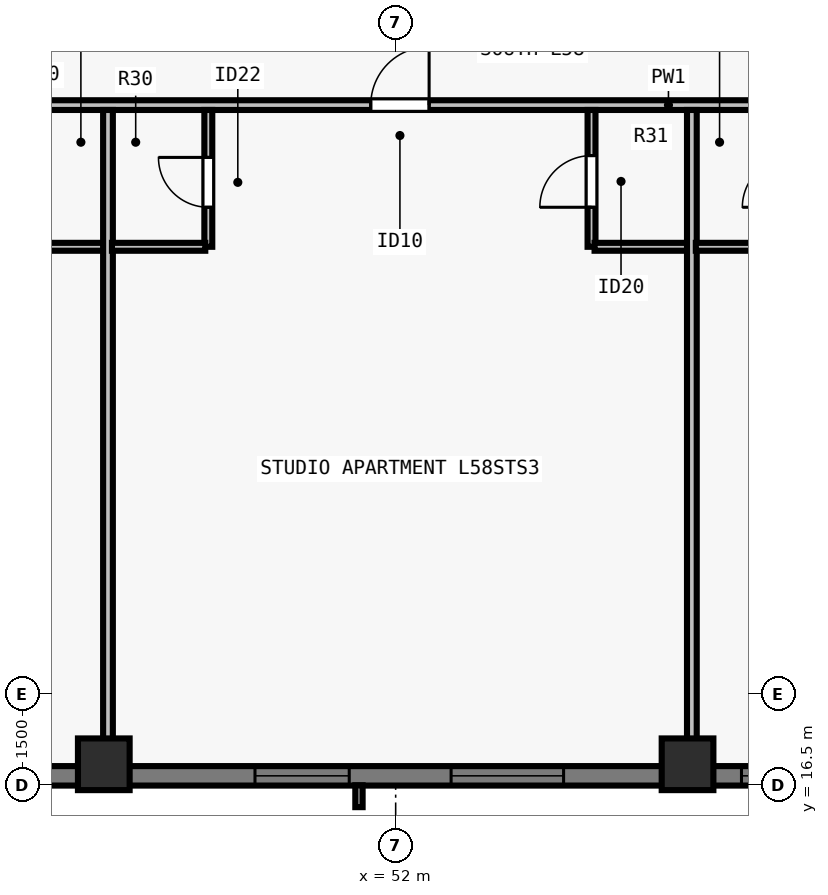
"""IFC4 building model, lengths in metres.
Left out: names, types, materials, properties, quantities, classifications, styles, units other than length and angle.
Written with IfcOpenShell. Run it as: python <this file> out.ifc"""

import sys

from ifc_helpers import new_model, si_unit, direction, frame, frame_2d, origin, origin_2d, place, context, subcontext, project, spatial, rectangle, extrude, element, fill, save


model = new_model("IFC4")
c1 = context("Model", 3, precision=1e-05, world=origin(), true_north=direction((0.0, 1.0)))
c2 = subcontext(c1, "Body", "Model", "MODEL_VIEW")
j1 = project(units=[si_unit("LENGTHUNIT", "METRE"), si_unit("PLANEANGLEUNIT", "RADIAN")], contexts=[c1])
p1 = place(None, origin())
s1 = spatial("IfcSite", under=j1, at=p1, CompositionType="ELEMENT")
p2 = place(p1, origin())
s2 = spatial("IfcBuilding", under=s1, at=p2, CompositionType="ELEMENT")
p3 = place(p2, frame((0.0, 0.0, 213.0)))
s3 = spatial("IfcBuildingStorey", under=s2, at=p3, CompositionType="ELEMENT", Elevation=213.0)
for number, where, z_axis, x_axis in (
    (1, (47.2, 16.85, 0.0), (0.0, 0.0, 1.0), (1.0, 0.0, 0.0)),
    (2, (56.8, 16.85, 0.0), (0.0, 0.0, 1.0), (1.0, 0.0, 0.0)),
):
    element("IfcColumn", number, at=place(p3, frame(where, z_axis=z_axis, x_axis=x_axis)), inside=s3, PredefinedType="COLUMN", context=c2, shape_type="SweptSolid", body=[
        extrude(rectangle(XDim=0.85, YDim=0.85, at=origin_2d()), origin(), (0.0, 0.0, 1.0), 3.5),
    ])
p4 = place(p3, frame((69.5, 16.66, 0.0), z_axis=(0.0, 0.0, 1.0), x_axis=(-1.0, 0.0, 0.0)))
e3 = element("IfcWall", 3, at=p4, inside=s3, PredefinedType="SOLIDWALL", context=c2, shape_type="SweptSolid", body=[
    extrude(rectangle(XDim=34.702, YDim=0.32, at=frame_2d((17.351, 0.0))), origin(), (0.0, 0.0, 1.0), 3.29),
])
p5 = place(p4, frame((5.213, 0.0, 0.8)))
e4 = element("IfcOpeningElement", 4, at=p5, cuts=e3, PredefinedType="OPENING", context=c2, shape_type="SweptSolid", body=[
    extrude(rectangle(XDim=1.55, YDim=1.678, at=frame_2d((0.775, 0.839))), frame((0.0, 0.17, 0.0), z_axis=(0.0, -1.0, 0.0), x_axis=(1.0, 0.0, 0.0)), (0.0, 0.0, 1.0), 0.34),
])
p6 = place(p4, frame((7.988, 0.0, 0.8)))
e5 = element("IfcOpeningElement", 5, at=p6, cuts=e3, PredefinedType="OPENING", context=c2, shape_type="SweptSolid", body=[
    extrude(rectangle(XDim=1.85, YDim=1.678, at=frame_2d((0.925, 0.839))), frame((0.0, 0.17, 0.0), z_axis=(0.0, -1.0, 0.0), x_axis=(1.0, 0.0, 0.0)), (0.0, 0.0, 1.0), 0.34),
])
p7 = place(p4, frame((10.263, 0.0, 0.8)))
e6 = element("IfcOpeningElement", 6, at=p7, cuts=e3, PredefinedType="OPENING", context=c2, shape_type="SweptSolid", body=[
    extrude(rectangle(XDim=1.55, YDim=1.678, at=frame_2d((0.775, 0.839))), frame((0.0, 0.17, 0.0), z_axis=(0.0, -1.0, 0.0), x_axis=(1.0, 0.0, 0.0)), (0.0, 0.0, 1.0), 0.34),
])
p8 = place(p4, frame((14.738, 0.0, 0.8)))
e7 = element("IfcOpeningElement", 7, at=p8, cuts=e3, PredefinedType="OPENING", context=c2, shape_type="SweptSolid", body=[
    extrude(rectangle(XDim=1.85, YDim=1.678, at=frame_2d((0.925, 0.839))), frame((0.0, 0.17, 0.0), z_axis=(0.0, -1.0, 0.0), x_axis=(1.0, 0.0, 0.0)), (0.0, 0.0, 1.0), 0.34),
])
p9 = place(p4, frame((18.264, 0.0, 0.8)))
e8 = element("IfcOpeningElement", 8, at=p9, cuts=e3, PredefinedType="OPENING", context=c2, shape_type="SweptSolid", body=[
    extrude(rectangle(XDim=1.55, YDim=1.678, at=frame_2d((0.775, 0.839))), frame((0.0, 0.17, 0.0), z_axis=(0.0, -1.0, 0.0), x_axis=(1.0, 0.0, 0.0)), (0.0, 0.0, 1.0), 0.34),
])
p10 = place(p4, frame((25.014, 0.0, 0.8)))
e9 = element("IfcOpeningElement", 9, at=p10, cuts=e3, PredefinedType="OPENING", context=c2, shape_type="SweptSolid", body=[
    extrude(rectangle(XDim=1.55, YDim=1.678, at=frame_2d((0.775, 0.839))), frame((0.0, 0.17, 0.0), z_axis=(0.0, -1.0, 0.0), x_axis=(1.0, 0.0, 0.0)), (0.0, 0.0, 1.0), 0.34),
])
p11 = place(p4, frame((27.789, 0.0, 0.8)))
e10 = element("IfcOpeningElement", 10, at=p11, cuts=e3, PredefinedType="OPENING", context=c2, shape_type="SweptSolid", body=[
    extrude(rectangle(XDim=1.85, YDim=1.678, at=frame_2d((0.925, 0.839))), frame((0.0, 0.17, 0.0), z_axis=(0.0, -1.0, 0.0), x_axis=(1.0, 0.0, 0.0)), (0.0, 0.0, 1.0), 0.34),
])
p12 = place(p4, frame((30.71, 0.0, 0.8)))
e11 = element("IfcOpeningElement", 11, at=p12, cuts=e3, PredefinedType="OPENING", context=c2, shape_type="SweptSolid", body=[
    extrude(rectangle(XDim=0.9, YDim=1.678, at=frame_2d((0.45, 0.839))), frame((0.0, 0.17, 0.0), z_axis=(0.0, -1.0, 0.0), x_axis=(1.0, 0.0, 0.0)), (0.0, 0.0, 1.0), 0.34),
])
p13 = place(p3, frame((29.805, 27.69, 0.0), z_axis=(0.0, 0.0, 1.0), x_axis=(1.0, 0.0, 0.0)))
e12 = element("IfcWall", 12, at=p13, inside=s3, PredefinedType="PARTITIONING", context=c2, shape_type="SweptSolid", body=[
    extrude(rectangle(XDim=44.39, YDim=0.16, at=frame_2d((22.195, 0.0))), origin(), (0.0, 0.0, 1.0), 2.958),
])
p14 = place(p13, frame((4.279, 0.0, 0.0)))
e13 = element("IfcOpeningElement", 13, at=p14, cuts=e12, PredefinedType="OPENING", context=c2, shape_type="SweptSolid", body=[
    extrude(rectangle(XDim=0.96, YDim=2.18, at=frame_2d((0.48, 1.09))), frame((0.0, 0.09, 0.0), z_axis=(0.0, -1.0, 0.0), x_axis=(1.0, 0.0, 0.0)), (0.0, 0.0, 1.0), 0.18),
])
p15 = place(p13, frame((12.953, 0.0, 0.0)))
e14 = element("IfcOpeningElement", 14, at=p15, cuts=e12, PredefinedType="OPENING", context=c2, shape_type="SweptSolid", body=[
    extrude(rectangle(XDim=0.96, YDim=2.18, at=frame_2d((0.48, 1.09))), frame((0.0, 0.09, 0.0), z_axis=(0.0, -1.0, 0.0), x_axis=(1.0, 0.0, 0.0)), (0.0, 0.0, 1.0), 0.18),
])
p16 = place(p13, frame((21.785, 0.0, 0.0)))
e15 = element("IfcOpeningElement", 15, at=p16, cuts=e12, PredefinedType="OPENING", context=c2, shape_type="SweptSolid", body=[
    extrude(rectangle(XDim=0.96, YDim=2.18, at=frame_2d((0.48, 1.09))), frame((0.0, 0.09, 0.0), z_axis=(0.0, -1.0, 0.0), x_axis=(1.0, 0.0, 0.0)), (0.0, 0.0, 1.0), 0.18),
])
p17 = place(p13, frame((30.617, 0.0, 0.0)))
e16 = element("IfcOpeningElement", 16, at=p17, cuts=e12, PredefinedType="OPENING", context=c2, shape_type="SweptSolid", body=[
    extrude(rectangle(XDim=0.96, YDim=2.18, at=frame_2d((0.48, 1.09))), frame((0.0, 0.09, 0.0), z_axis=(0.0, -1.0, 0.0), x_axis=(1.0, 0.0, 0.0)), (0.0, 0.0, 1.0), 0.18),
])
p18 = place(p13, frame((39.221, 0.0, 0.0)))
e17 = element("IfcOpeningElement", 17, at=p18, cuts=e12, PredefinedType="OPENING", context=c2, shape_type="SweptSolid", body=[
    extrude(rectangle(XDim=0.96, YDim=2.18, at=frame_2d((0.48, 1.09))), frame((0.0, 0.09, 0.0), z_axis=(0.0, -1.0, 0.0), x_axis=(1.0, 0.0, 0.0)), (0.0, 0.0, 1.0), 0.18),
])
p19 = place(p3, frame((45.669, 25.36, 0.0), z_axis=(0.0, 0.0, 1.0), x_axis=(1.0, 0.0, 0.0)))
e18 = element("IfcWall", 18, at=p19, inside=s3, PredefinedType="PLUMBINGWALL", context=c2, shape_type="SweptSolid", body=[
    extrude(rectangle(XDim=1.6, YDim=0.13, at=frame_2d((0.8, 0.0))), origin(), (0.0, 0.0, 1.0), 3.29),
])
p20 = place(p3, frame((47.269, 16.805, 0.0), z_axis=(0.0, 0.0, 1.0), x_axis=(0.0, 1.0, 0.0)))
e19 = element("IfcWall", 19, at=p20, inside=s3, PredefinedType="PARTITIONING", context=c2, shape_type="SweptSolid", body=[
    extrude(rectangle(XDim=10.805, YDim=0.16, at=frame_2d((5.403, 0.0))), origin(), (0.0, 0.0, 1.0), 2.573),
])
p21 = place(p3, frame((48.919, 25.36, 0.0), z_axis=(0.0, 0.0, 1.0), x_axis=(0.0, 1.0, 0.0)))
e20 = element("IfcWall", 20, at=p21, inside=s3, PredefinedType="PLUMBINGWALL", context=c2, shape_type="SweptSolid", body=[
    extrude(rectangle(XDim=2.25, YDim=0.13, at=frame_2d((1.125, 0.0))), origin(), (0.0, 0.0, 1.0), 3.29),
])
p22 = place(p21, frame((0.65, 0.0, 0.0)))
e21 = element("IfcOpeningElement", 21, at=p22, cuts=e20, PredefinedType="OPENING", context=c2, shape_type="SweptSolid", body=[
    extrude(rectangle(XDim=0.82, YDim=2.1, at=frame_2d((0.41, 1.05))), frame((0.0, 0.075, 0.0), z_axis=(0.0, -1.0, 0.0), x_axis=(1.0, 0.0, 0.0)), (0.0, 0.0, 1.0), 0.15),
])
p23 = place(p3, frame((47.334, 25.36, 0.0), z_axis=(0.0, 0.0, 1.0), x_axis=(1.0, 0.0, 0.0)))
e22 = element("IfcWall", 22, at=p23, inside=s3, PredefinedType="PLUMBINGWALL", context=c2, shape_type="SweptSolid", body=[
    extrude(rectangle(XDim=1.535, YDim=0.13, at=frame_2d((0.768, 0.0))), origin(), (0.0, 0.0, 1.0), 3.29),
])
p24 = place(p3, frame((55.221, 25.36, 0.0), z_axis=(0.0, 0.0, 1.0), x_axis=(0.0, 1.0, 0.0)))
e23 = element("IfcWall", 23, at=p24, inside=s3, PredefinedType="PLUMBINGWALL", context=c2, shape_type="SweptSolid", body=[
    extrude(rectangle(XDim=2.25, YDim=0.13, at=frame_2d((1.125, 0.0))), origin(), (0.0, 0.0, 1.0), 3.29),
])
p25 = place(p24, frame((0.65, 0.0, 0.0)))
e24 = element("IfcOpeningElement", 24, at=p25, cuts=e23, PredefinedType="OPENING", context=c2, shape_type="SweptSolid", body=[
    extrude(rectangle(XDim=0.85, YDim=2.1, at=frame_2d((0.425, 1.05))), frame((0.0, 0.075, 0.0), z_axis=(0.0, -1.0, 0.0), x_axis=(1.0, 0.0, 0.0)), (0.0, 0.0, 1.0), 0.15),
])
p26 = place(p3, frame((55.271, 25.36, 0.0), z_axis=(0.0, 0.0, 1.0), x_axis=(1.0, 0.0, 0.0)))
e25 = element("IfcWall", 25, at=p26, inside=s3, PredefinedType="PLUMBINGWALL", context=c2, shape_type="SweptSolid", body=[
    extrude(rectangle(XDim=1.6, YDim=0.13, at=frame_2d((0.8, 0.0))), origin(), (0.0, 0.0, 1.0), 3.29),
])
p27 = place(p3, frame((56.871, 16.805, 0.0), z_axis=(0.0, 0.0, 1.0), x_axis=(0.0, 1.0, 0.0)))
e26 = element("IfcWall", 26, at=p27, inside=s3, PredefinedType="PARTITIONING", context=c2, shape_type="SweptSolid", body=[
    extrude(rectangle(XDim=10.805, YDim=0.16, at=frame_2d((5.403, 0.0))), origin(), (0.0, 0.0, 1.0), 2.573),
])
p28 = place(p3, frame((56.936, 25.36, 0.0), z_axis=(0.0, 0.0, 1.0), x_axis=(1.0, 0.0, 0.0)))
e27 = element("IfcWall", 27, at=p28, inside=s3, PredefinedType="PLUMBINGWALL", context=c2, shape_type="SweptSolid", body=[
    extrude(rectangle(XDim=1.535, YDim=0.13, at=frame_2d((0.768, 0.0))), origin(), (0.0, 0.0, 1.0), 3.29),
])
p29 = place(p7, origin())
e28 = element("IfcWindow", 28, at=p29, inside=s3, PartitioningType="SINGLE_PANEL", PredefinedType="WINDOW", context=c2, shape_type="SweptSolid", body=[
    extrude(rectangle(XDim=1.55, YDim=1.678, at=frame_2d((0.775, 0.839))), frame((0.0, -0.05, 0.0), z_axis=(0.0, -1.0, 0.0), x_axis=(1.0, 0.0, 0.0)), (0.0, 0.0, 1.0), 0.06),
])
fill(e6, e28)
p30 = place(p8, origin())
e29 = element("IfcWindow", 29, at=p30, inside=s3, PartitioningType="SINGLE_PANEL", PredefinedType="WINDOW", context=c2, shape_type="SweptSolid", body=[
    extrude(rectangle(XDim=1.85, YDim=1.678, at=frame_2d((0.925, 0.839))), frame((0.0, -0.05, 0.0), z_axis=(0.0, -1.0, 0.0), x_axis=(1.0, 0.0, 0.0)), (0.0, 0.0, 1.0), 0.06),
])
fill(e7, e29)
p31 = place(p9, origin())
e30 = element("IfcWindow", 30, at=p31, inside=s3, PartitioningType="SINGLE_PANEL", PredefinedType="WINDOW", context=c2, shape_type="SweptSolid", body=[
    extrude(rectangle(XDim=1.55, YDim=1.678, at=frame_2d((0.775, 0.839))), frame((0.0, -0.05, 0.0), z_axis=(0.0, -1.0, 0.0), x_axis=(1.0, 0.0, 0.0)), (0.0, 0.0, 1.0), 0.06),
])
fill(e8, e30)
p32 = place(p22, origin())
e31 = element("IfcDoor", 31, at=p32, inside=s3, OperationType="SINGLE_SWING_RIGHT", PredefinedType="DOOR", context=c2, shape_type="SweptSolid", body=[
    extrude(rectangle(XDim=0.82, YDim=2.1, at=frame_2d((0.41, 1.05))), frame((0.0, 0.025, 0.0), z_axis=(0.0, -1.0, 0.0), x_axis=(1.0, 0.0, 0.0)), (0.0, 0.0, 1.0), 0.05),
])
fill(e21, e31)
p33 = place(p25, origin())
e32 = element("IfcDoor", 32, at=p33, inside=s3, OperationType="SINGLE_SWING_LEFT", PredefinedType="DOOR", context=c2, shape_type="SweptSolid", body=[
    extrude(rectangle(XDim=0.85, YDim=2.1, at=frame_2d((0.425, 1.05))), frame((0.0, 0.025, 0.0), z_axis=(0.0, -1.0, 0.0), x_axis=(1.0, 0.0, 0.0)), (0.0, 0.0, 1.0), 0.05),
])
fill(e24, e32)
p34 = place(p16, origin())
e33 = element("IfcDoor", 33, at=p34, inside=s3, OperationType="SINGLE_SWING_RIGHT", PredefinedType="DOOR", context=c2, shape_type="SweptSolid", body=[
    extrude(rectangle(XDim=0.96, YDim=2.18, at=frame_2d((0.48, 1.09))), frame((0.0, 0.025, 0.0), z_axis=(0.0, -1.0, 0.0), x_axis=(1.0, 0.0, 0.0)), (0.0, 0.0, 1.0), 0.05),
])
fill(e15, e33)
save(model, sys.argv[1])
